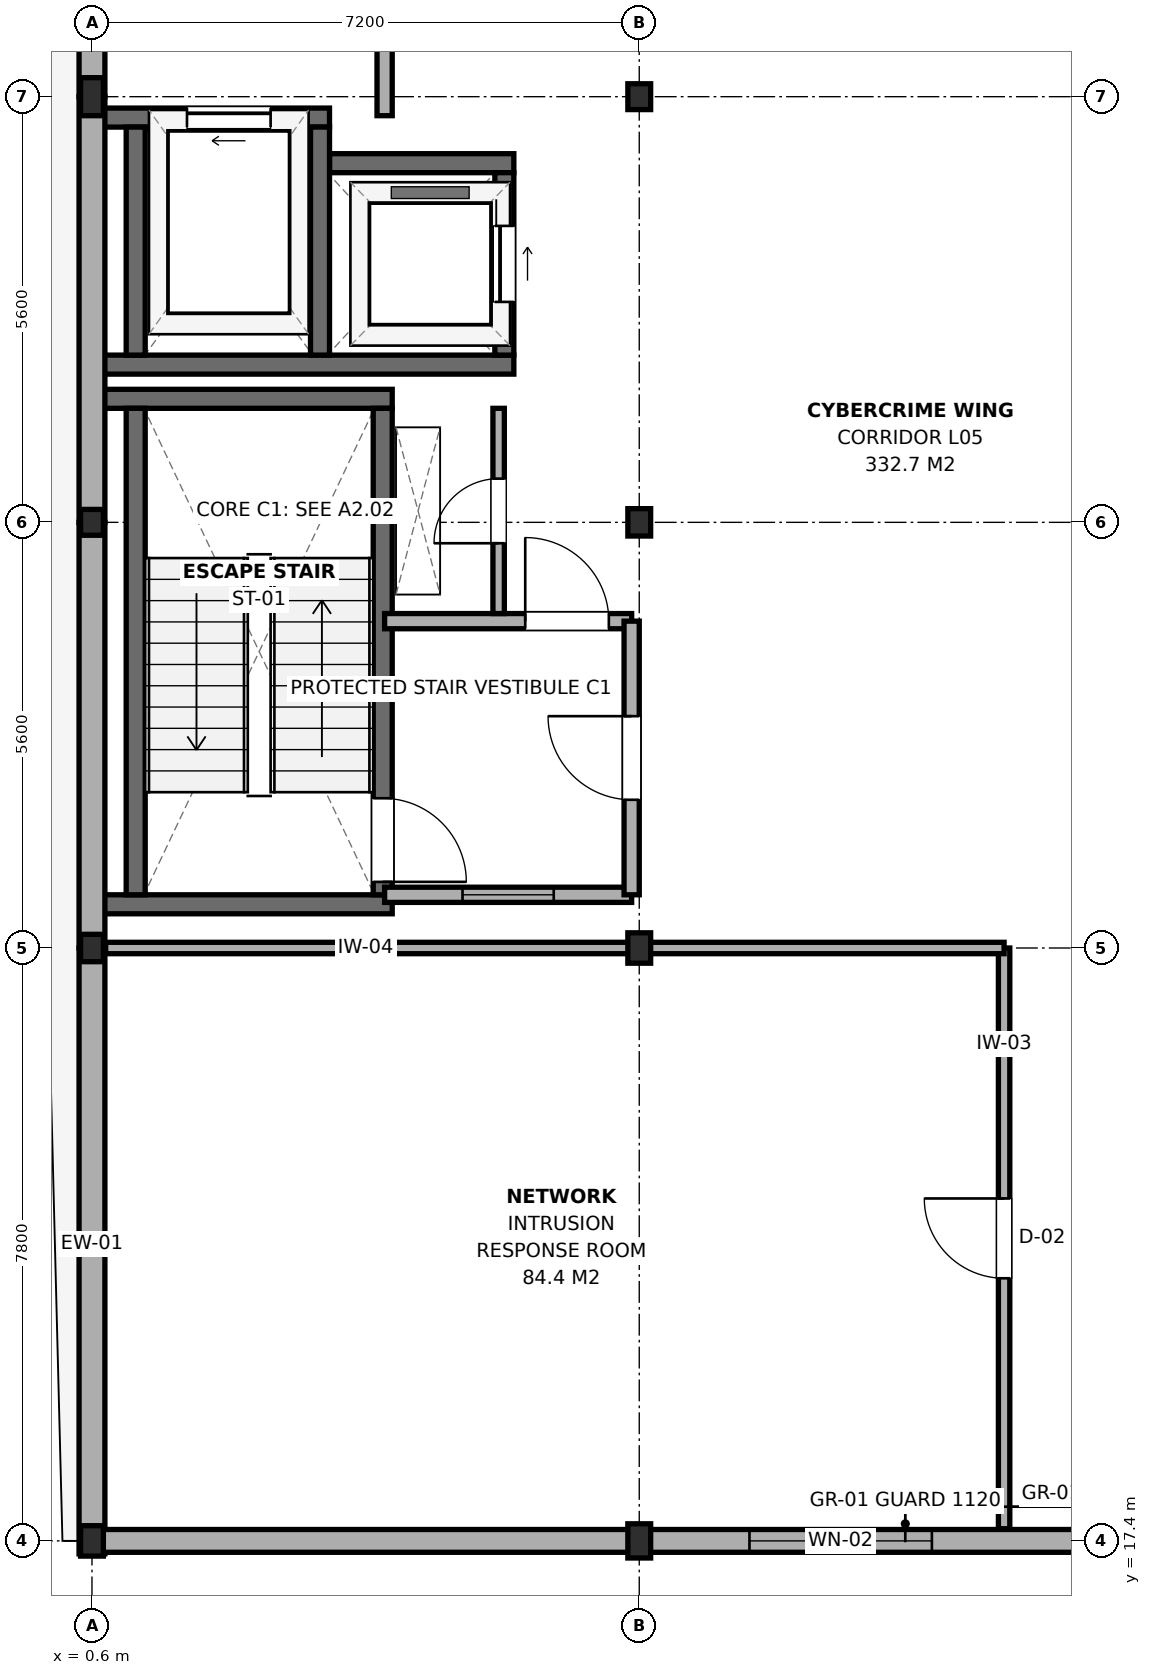
"""IFC4 building model, lengths in metres.
Left out: names, types, materials, properties, quantities, classifications, styles, units other than length and angle.
Written with IfcOpenShell. Run it as: python <this file> out.ifc"""

import sys

from ifc_helpers import new_model, si_unit, direction, frame, frame_2d, origin, origin_2d, place, context, subcontext, project, spatial, rectangle, i_section, extrude, element, fill, save


model = new_model("IFC4")
c1 = context("Model", 3, precision=1e-05, world=origin(), true_north=direction((0.0, 1.0)))
c2 = subcontext(c1, "Body", "Model", "MODEL_VIEW")
j1 = project(units=[si_unit("LENGTHUNIT", "METRE"), si_unit("PLANEANGLEUNIT", "RADIAN")], contexts=[c1])
p1 = place(None, origin())
s1 = spatial("IfcSite", under=j1, at=p1, CompositionType="ELEMENT")
p2 = place(p1, origin())
s2 = spatial("IfcBuilding", under=s1, at=p2, CompositionType="ELEMENT")
p3 = place(p2, frame((0.0, 0.0, 21.0)))
s3 = spatial("IfcBuildingStorey", under=s2, at=p3, CompositionType="ELEMENT", Elevation=21.0)
p4 = place(p3, frame((0.6, 17.4, 0.0), z_axis=(0.0, 0.0, 1.0), x_axis=(1.0, 0.0, 0.0)))
e1 = element("IfcColumn", 1, at=p4, inside=s3, PredefinedType="COLUMN", context=c2, shape_type="SweptSolid", body=[
    extrude(i_section(OverallWidth=0.3, OverallDepth=0.4, WebThickness=0.013, FlangeThickness=0.024, FilletRadius=0.027, at=origin_2d()), origin(), (0.0, 0.0, 1.0), 3.9),
])
p5 = place(p3, frame((0.6, 25.2, 0.0), z_axis=(0.0, 0.0, 1.0), x_axis=(1.0, 0.0, 0.0)))
e2 = element("IfcColumn", 2, at=p5, inside=s3, PredefinedType="COLUMN", context=c2, shape_type="SweptSolid", body=[
    extrude(i_section(OverallWidth=0.3, OverallDepth=0.36, WebThickness=0.012, FlangeThickness=0.022, FilletRadius=0.027, at=origin_2d()), origin(), (0.0, 0.0, 1.0), 3.9),
])
p6 = place(p3, frame((0.6, 30.8, 0.0), z_axis=(0.0, 0.0, 1.0), x_axis=(1.0, 0.0, 0.0)))
e3 = element("IfcColumn", 3, at=p6, inside=s3, PredefinedType="COLUMN", context=c2, shape_type="SweptSolid", body=[
    extrude(i_section(OverallWidth=0.3, OverallDepth=0.34, WebThickness=0.012, FlangeThickness=0.021, FilletRadius=0.027, at=origin_2d()), origin(), (0.0, 0.0, 1.0), 3.9),
])
p7 = place(p3, frame((0.6, 36.4, 0.0), z_axis=(0.0, 0.0, 1.0), x_axis=(1.0, 0.0, 0.0)))
e4 = element("IfcColumn", 4, at=p7, inside=s3, PredefinedType="COLUMN", context=c2, shape_type="SweptSolid", body=[
    extrude(i_section(OverallWidth=0.3, OverallDepth=0.5, WebThickness=0.014, FlangeThickness=0.028, FilletRadius=0.027, at=origin_2d()), origin(), (0.0, 0.0, 1.0), 3.9),
])
p8 = place(p3, frame((7.8, 17.4, 0.0), z_axis=(0.0, 0.0, 1.0), x_axis=(1.0, 0.0, 0.0)))
e5 = element("IfcColumn", 5, at=p8, inside=s3, PredefinedType="COLUMN", context=c2, shape_type="SweptSolid", body=[
    extrude(i_section(OverallWidth=0.3, OverallDepth=0.45, WebThickness=0.014, FlangeThickness=0.026, FilletRadius=0.027, at=origin_2d()), origin(), (0.0, 0.0, 1.0), 3.9),
])
p9 = place(p3, frame((7.8, 25.2, 0.0), z_axis=(0.0, 0.0, 1.0), x_axis=(1.0, 0.0, 0.0)))
e6 = element("IfcColumn", 6, at=p9, inside=s3, PredefinedType="COLUMN", context=c2, shape_type="SweptSolid", body=[
    extrude(i_section(OverallWidth=0.3, OverallDepth=0.4, WebThickness=0.013, FlangeThickness=0.024, FilletRadius=0.027, at=origin_2d()), origin(), (0.0, 0.0, 1.0), 3.9),
])
p10 = place(p3, frame((7.8, 30.8, 0.0), z_axis=(0.0, 0.0, 1.0), x_axis=(1.0, 0.0, 0.0)))
e7 = element("IfcColumn", 7, at=p10, inside=s3, PredefinedType="COLUMN", context=c2, shape_type="SweptSolid", body=[
    extrude(i_section(OverallWidth=0.3, OverallDepth=0.36, WebThickness=0.012, FlangeThickness=0.022, FilletRadius=0.027, at=origin_2d()), origin(), (0.0, 0.0, 1.0), 3.9),
])
p11 = place(p3, frame((7.8, 36.4, 0.0), z_axis=(0.0, 0.0, 1.0), x_axis=(1.0, 0.0, 0.0)))
e8 = element("IfcColumn", 8, at=p11, inside=s3, PredefinedType="COLUMN", context=c2, shape_type="SweptSolid", body=[
    extrude(i_section(OverallWidth=0.3, OverallDepth=0.34, WebThickness=0.012, FlangeThickness=0.021, FilletRadius=0.027, at=origin_2d()), origin(), (0.0, 0.0, 1.0), 3.9),
])
for number, where, z_axis, x_axis in (
    (9, (0.75, 25.775, 0.0), (0.0, 0.0, 1.0), (1.0, 0.0, 0.0)),
    (10, (0.75, 32.425, 0.0), (0.0, 0.0, 1.0), (1.0, 0.0, 0.0)),
):
    element("IfcWall", number, at=place(p3, frame(where, z_axis=z_axis, x_axis=x_axis)), inside=s3, PredefinedType="SHEAR", context=c2, shape_type="SweptSolid", body=[
        extrude(rectangle(XDim=3.8, YDim=0.25, at=frame_2d((1.9, 0.0))), origin(), (0.0, 0.0, 1.0), 3.7),
    ])
p12 = place(p3, frame((1.175, 25.9, 0.0), z_axis=(0.0, 0.0, 1.0), x_axis=(0.0, 1.0, 0.0)))
e11 = element("IfcWall", 11, at=p12, inside=s3, PredefinedType="SHEAR", context=c2, shape_type="SweptSolid", body=[
    extrude(rectangle(XDim=6.4, YDim=0.25, at=frame_2d((3.2, 0.0))), origin(), (0.0, 0.0, 1.0), 3.7),
])
p13 = place(p3, frame((4.425, 25.9, 0.0), z_axis=(0.0, 0.0, 1.0), x_axis=(0.0, 1.0, 0.0)))
e12 = element("IfcWall", 12, at=p13, inside=s3, PredefinedType="SHEAR", context=c2, shape_type="SweptSolid", body=[
    extrude(rectangle(XDim=6.4, YDim=0.25, at=frame_2d((3.2, 0.0))), origin(), (0.0, 0.0, 1.0), 3.7),
])
p14 = place(p13, frame((0.17, 0.0, 0.0)))
e13 = element("IfcOpeningElement", 13, at=p14, cuts=e12, PredefinedType="OPENING", context=c2, shape_type="SweptSolid", body=[
    extrude(rectangle(XDim=1.1, YDim=2.15, at=frame_2d((0.55, 1.075))), frame((0.0, 0.14, 0.0), z_axis=(0.0, -1.0, 0.0), x_axis=(1.0, 0.0, 0.0)), (0.0, 0.0, 1.0), 0.28),
])
p15 = place(p3, frame((0.75, 32.875, 0.0), z_axis=(0.0, 0.0, 1.0), x_axis=(1.0, 0.0, 0.0)))
e14 = element("IfcWall", 14, at=p15, inside=s3, PredefinedType="SHEAR", context=c2, shape_type="SweptSolid", body=[
    extrude(rectangle(XDim=5.4, YDim=0.25, at=frame_2d((2.7, 0.0))), origin(), (0.0, 0.0, 1.0), 3.7),
])
p16 = place(p3, frame((0.75, 36.125, 0.0), z_axis=(0.0, 0.0, 1.0), x_axis=(1.0, 0.0, 0.0)))
e15 = element("IfcWall", 15, at=p16, inside=s3, PredefinedType="SHEAR", context=c2, shape_type="SweptSolid", body=[
    extrude(rectangle(XDim=2.975, YDim=0.25, at=frame_2d((1.488, 0.0))), origin(), (0.0, 0.0, 1.0), 3.7),
])
p17 = place(p16, frame((1.1, 0.0, 0.0)))
e16 = element("IfcOpeningElement", 16, at=p17, cuts=e15, PredefinedType="OPENING", context=c2, shape_type="SweptSolid", body=[
    extrude(rectangle(XDim=1.1, YDim=2.15, at=frame_2d((0.55, 1.075))), frame((0.0, 0.14, 0.0), z_axis=(0.0, -1.0, 0.0), x_axis=(1.0, 0.0, 0.0)), (0.0, 0.0, 1.0), 0.28),
])
p18 = place(p3, frame((3.725, 35.525, 0.0), z_axis=(0.0, 0.0, 1.0), x_axis=(1.0, 0.0, 0.0)))
e17 = element("IfcWall", 17, at=p18, inside=s3, PredefinedType="SHEAR", context=c2, shape_type="SweptSolid", body=[
    extrude(rectangle(XDim=2.425, YDim=0.25, at=frame_2d((1.212, 0.0))), origin(), (0.0, 0.0, 1.0), 3.7),
])
for number, where, z_axis, x_axis in (
    (18, (1.175, 33.0, 0.0), (0.0, 0.0, 1.0), (0.0, 1.0, 0.0)),
    (19, (3.6, 33.0, 0.0), (0.0, 0.0, 1.0), (0.0, 1.0, 0.0)),
):
    element("IfcWall", number, at=place(p3, frame(where, z_axis=z_axis, x_axis=x_axis)), inside=s3, PredefinedType="SHEAR", context=c2, shape_type="SweptSolid", body=[
        extrude(rectangle(XDim=3.0, YDim=0.25, at=frame_2d((1.5, 0.0))), origin(), (0.0, 0.0, 1.0), 3.7),
    ])
p19 = place(p3, frame((6.025, 33.0, 0.0), z_axis=(0.0, 0.0, 1.0), x_axis=(0.0, 1.0, 0.0)))
e20 = element("IfcWall", 20, at=p19, inside=s3, PredefinedType="SHEAR", context=c2, shape_type="SweptSolid", body=[
    extrude(rectangle(XDim=2.4, YDim=0.25, at=frame_2d((1.2, 0.0))), origin(), (0.0, 0.0, 1.0), 3.7),
])
p20 = place(p19, frame((0.7, 0.0, 0.0)))
e21 = element("IfcOpeningElement", 21, at=p20, cuts=e20, PredefinedType="OPENING", context=c2, shape_type="SweptSolid", body=[
    extrude(rectangle(XDim=1.0, YDim=2.15, at=frame_2d((0.5, 1.075))), frame((0.0, 0.14, 0.0), z_axis=(0.0, -1.0, 0.0), x_axis=(1.0, 0.0, 0.0)), (0.0, 0.0, 1.0), 0.28),
])
p21 = place(p3, frame((0.6, 17.23, 0.0), z_axis=(0.0, 0.0, 1.0), x_axis=(0.0, 1.0, 0.0)))
e22 = element("IfcWall", 22, at=p21, inside=s3, PredefinedType="SOLIDWALL", context=c2, shape_type="SweptSolid", body=[
    extrude(rectangle(XDim=7.97, YDim=0.34, at=frame_2d((3.985, 0.0))), origin(), (0.0, 0.0, 1.0), 3.245),
])
p22 = place(p3, frame((0.6, 25.2, 0.0), z_axis=(0.0, 0.0, 1.0), x_axis=(0.0, 1.0, 0.0)))
e23 = element("IfcWall", 23, at=p22, inside=s3, PredefinedType="SOLIDWALL", context=c2, shape_type="SweptSolid", body=[
    extrude(rectangle(XDim=5.6, YDim=0.34, at=frame_2d((2.8, 0.0))), origin(), (0.0, 0.0, 1.0), 3.245),
])
p23 = place(p3, frame((0.6, 30.8, 0.0), z_axis=(0.0, 0.0, 1.0), x_axis=(0.0, 1.0, 0.0)))
e24 = element("IfcWall", 24, at=p23, inside=s3, PredefinedType="SOLIDWALL", context=c2, shape_type="SweptSolid", body=[
    extrude(rectangle(XDim=5.6, YDim=0.34, at=frame_2d((2.8, 0.0))), origin(), (0.0, 0.0, 1.0), 3.095),
])
p24 = place(p3, frame((0.6, 36.4, 0.0), z_axis=(0.0, 0.0, 1.0), x_axis=(0.0, 1.0, 0.0)))
e25 = element("IfcWall", 25, at=p24, inside=s3, PredefinedType="SOLIDWALL", context=c2, shape_type="SweptSolid", body=[
    extrude(rectangle(XDim=5.6, YDim=0.34, at=frame_2d((2.8, 0.0))), origin(), (0.0, 0.0, 1.0), 3.095),
])
p25 = place(p24, frame((0.85, 0.0, 0.9)))
e26 = element("IfcOpeningElement", 26, at=p25, cuts=e25, PredefinedType="OPENING", context=c2, shape_type="SweptSolid", body=[
    extrude(rectangle(XDim=2.0, YDim=1.8, at=frame_2d((1.0, 0.9))), frame((0.0, 0.185, 0.0), z_axis=(0.0, -1.0, 0.0), x_axis=(1.0, 0.0, 0.0)), (0.0, 0.0, 1.0), 0.37),
])
p26 = place(p3, frame((0.45, 17.4, 0.0), z_axis=(0.0, 0.0, 1.0), x_axis=(1.0, 0.0, 0.0)))
e27 = element("IfcWall", 27, at=p26, inside=s3, PredefinedType="SOLIDWALL", context=c2, shape_type="SweptSolid", body=[
    extrude(rectangle(XDim=7.35, YDim=0.3, at=frame_2d((3.675, 0.0))), origin(), (0.0, 0.0, 1.0), 3.245),
])
p27 = place(p3, frame((7.8, 17.4, 0.0), z_axis=(0.0, 0.0, 1.0), x_axis=(1.0, 0.0, 0.0)))
e28 = element("IfcWall", 28, at=p27, inside=s3, PredefinedType="SOLIDWALL", context=c2, shape_type="SweptSolid", body=[
    extrude(rectangle(XDim=7.2, YDim=0.3, at=frame_2d((3.6, 0.0))), origin(), (0.0, 0.0, 1.0), 3.245),
])
p28 = place(p27, frame((1.45, 0.0, 0.9)))
e29 = element("IfcOpeningElement", 29, at=p28, cuts=e28, PredefinedType="OPENING", context=c2, shape_type="SweptSolid", body=[
    extrude(rectangle(XDim=2.4, YDim=2.1, at=frame_2d((1.2, 1.05))), frame((0.0, 0.165, 0.0), z_axis=(0.0, -1.0, 0.0), x_axis=(1.0, 0.0, 0.0)), (0.0, 0.0, 1.0), 0.33),
])
p29 = place(p3, frame((4.45, 36.15, 0.0), z_axis=(0.0, 0.0, 1.0), x_axis=(0.0, 1.0, 0.0)))
e30 = element("IfcWall", 30, at=p29, inside=s3, PredefinedType="PARTITIONING", context=c2, shape_type="SweptSolid", body=[
    extrude(rectangle(XDim=3.4, YDim=0.2, at=frame_2d((1.7, 0.0))), origin(), (0.0, 0.0, 1.0), 3.365),
])
p30 = place(p29, frame((1.15, 0.0, 0.0)))
e31 = element("IfcOpeningElement", 31, at=p30, cuts=e30, PredefinedType="OPENING", context=c2, shape_type="SweptSolid", body=[
    extrude(rectangle(XDim=1.1, YDim=2.15, at=frame_2d((0.55, 1.075))), frame((0.0, 0.115, 0.0), z_axis=(0.0, -1.0, 0.0), x_axis=(1.0, 0.0, 0.0)), (0.0, 0.0, 1.0), 0.23),
])
p31 = place(p3, frame((4.45, 25.9, 0.0), z_axis=(0.0, 0.0, 1.0), x_axis=(1.0, 0.0, 0.0)))
e32 = element("IfcWall", 32, at=p31, inside=s3, PredefinedType="PARTITIONING", context=c2, shape_type="SweptSolid", body=[
    extrude(rectangle(XDim=3.25, YDim=0.2, at=frame_2d((1.625, 0.0))), origin(), (0.0, 0.0, 1.0), 3.195),
])
p32 = place(p31, frame((1.025, 0.0, 0.95)))
e33 = element("IfcOpeningElement", 33, at=p32, cuts=e32, PredefinedType="OPENING", context=c2, shape_type="SweptSolid", body=[
    extrude(rectangle(XDim=1.2, YDim=1.5, at=frame_2d((0.6, 0.75))), frame((0.0, 0.115, 0.0), z_axis=(0.0, -1.0, 0.0), x_axis=(1.0, 0.0, 0.0)), (0.0, 0.0, 1.0), 0.23),
])
p33 = place(p3, frame((4.45, 29.5, 0.0), z_axis=(0.0, 0.0, 1.0), x_axis=(1.0, 0.0, 0.0)))
e34 = element("IfcWall", 34, at=p33, inside=s3, PredefinedType="PARTITIONING", context=c2, shape_type="SweptSolid", body=[
    extrude(rectangle(XDim=3.25, YDim=0.2, at=frame_2d((1.625, 0.0))), origin(), (0.0, 0.0, 1.0), 3.195),
])
p34 = place(p33, frame((1.85, 0.0, 0.0)))
e35 = element("IfcOpeningElement", 35, at=p34, cuts=e34, PredefinedType="OPENING", context=c2, shape_type="SweptSolid", body=[
    extrude(rectangle(XDim=1.1, YDim=2.15, at=frame_2d((0.55, 1.075))), frame((0.0, 0.115, 0.0), z_axis=(0.0, -1.0, 0.0), x_axis=(1.0, 0.0, 0.0)), (0.0, 0.0, 1.0), 0.23),
])
p35 = place(p3, frame((7.7, 25.9, 0.0), z_axis=(0.0, 0.0, 1.0), x_axis=(0.0, 1.0, 0.0)))
e36 = element("IfcWall", 36, at=p35, inside=s3, PredefinedType="PARTITIONING", context=c2, shape_type="SweptSolid", body=[
    extrude(rectangle(XDim=3.6, YDim=0.2, at=frame_2d((1.8, 0.0))), origin(), (0.0, 0.0, 1.0), 3.195),
])
p36 = place(p35, frame((1.25, 0.0, 0.0)))
e37 = element("IfcOpeningElement", 37, at=p36, cuts=e36, PredefinedType="OPENING", context=c2, shape_type="SweptSolid", body=[
    extrude(rectangle(XDim=1.1, YDim=2.15, at=frame_2d((0.55, 1.075))), frame((0.0, 0.115, 0.0), z_axis=(0.0, -1.0, 0.0), x_axis=(1.0, 0.0, 0.0)), (0.0, 0.0, 1.0), 0.23),
])
p37 = place(p3, frame((5.95, 29.6, 0.0), z_axis=(0.0, 0.0, 1.0), x_axis=(0.0, 1.0, 0.0)))
e38 = element("IfcWall", 38, at=p37, inside=s3, PredefinedType="PARTITIONING", context=c2, shape_type="SweptSolid", body=[
    extrude(rectangle(XDim=2.7, YDim=0.15, at=frame_2d((1.35, 0.0))), origin(), (0.0, 0.0, 1.0), 3.695),
])
p38 = place(p37, frame((0.925, 0.0, 0.0)))
e39 = element("IfcOpeningElement", 39, at=p38, cuts=e38, PredefinedType="OPENING", context=c2, shape_type="SweptSolid", body=[
    extrude(rectangle(XDim=0.85, YDim=2.1, at=frame_2d((0.425, 1.05))), frame((0.0, 0.09, 0.0), z_axis=(0.0, -1.0, 0.0), x_axis=(1.0, 0.0, 0.0)), (0.0, 0.0, 1.0), 0.18),
])
p39 = place(p3, frame((12.6, 17.56, 0.0), z_axis=(0.0, 0.0, 1.0), x_axis=(0.0, 1.0, 0.0)))
e40 = element("IfcWall", 40, at=p39, inside=s3, PredefinedType="PARTITIONING", context=c2, shape_type="SweptSolid", body=[
    extrude(rectangle(XDim=7.64, YDim=0.15, at=frame_2d((3.82, 0.0))), origin(), (0.0, 0.0, 1.0), 3.145),
])
p40 = place(p39, frame((3.295, 0.0, 0.0)))
e41 = element("IfcOpeningElement", 41, at=p40, cuts=e40, PredefinedType="OPENING", context=c2, shape_type="SweptSolid", body=[
    extrude(rectangle(XDim=1.05, YDim=2.15, at=frame_2d((0.525, 1.075))), frame((0.0, 0.09, 0.0), z_axis=(0.0, -1.0, 0.0), x_axis=(1.0, 0.0, 0.0)), (0.0, 0.0, 1.0), 0.18),
])
p41 = place(p3, frame((0.78, 25.2, 0.0), z_axis=(0.0, 0.0, 1.0), x_axis=(1.0, 0.0, 0.0)))
e42 = element("IfcWall", 42, at=p41, inside=s3, PredefinedType="PARTITIONING", context=c2, shape_type="SweptSolid", body=[
    extrude(rectangle(XDim=11.82, YDim=0.15, at=frame_2d((5.91, 0.0))), origin(), (0.0, 0.0, 1.0), 3.095),
])
p42 = place(p28, origin())
e43 = element("IfcWindow", 43, at=p42, inside=s3, PartitioningType="SINGLE_PANEL", PredefinedType="WINDOW", context=c2, shape_type="SweptSolid", body=[
    extrude(rectangle(XDim=2.4, YDim=2.1, at=frame_2d((1.2, 1.05))), frame((0.0, 0.03, 0.0), z_axis=(0.0, -1.0, 0.0), x_axis=(1.0, 0.0, 0.0)), (0.0, 0.0, 1.0), 0.06),
])
fill(e29, e43)
p43 = place(p14, frame((1.1, 0.0, 0.0), z_axis=(0.0, 0.0, 1.0), x_axis=(-1.0, 0.0, 0.0)))
e44 = element("IfcDoor", 44, at=p43, inside=s3, OperationType="SINGLE_SWING_RIGHT", PredefinedType="DOOR", context=c2, shape_type="SweptSolid", body=[
    extrude(rectangle(XDim=1.1, YDim=2.15, at=frame_2d((0.55, 1.075))), frame((0.0, 0.025, 0.0), z_axis=(0.0, -1.0, 0.0), x_axis=(1.0, 0.0, 0.0)), (0.0, 0.0, 1.0), 0.05),
])
fill(e13, e44)
p44 = place(p17, origin())
e45 = element("IfcDoor", 45, at=p44, inside=s3, OperationType="SLIDING_TO_LEFT", PredefinedType="DOOR", context=c2, shape_type="SweptSolid", body=[
    extrude(rectangle(XDim=1.1, YDim=2.15, at=frame_2d((0.55, 1.075))), frame((0.0, 0.025, 0.0), z_axis=(0.0, -1.0, 0.0), x_axis=(1.0, 0.0, 0.0)), (0.0, 0.0, 1.0), 0.05),
])
fill(e16, e45)
p45 = place(p20, frame((1.0, 0.0, 0.0), z_axis=(0.0, 0.0, 1.0), x_axis=(-1.0, 0.0, 0.0)))
e46 = element("IfcDoor", 46, at=p45, inside=s3, OperationType="SLIDING_TO_RIGHT", PredefinedType="DOOR", context=c2, shape_type="SweptSolid", body=[
    extrude(rectangle(XDim=1.0, YDim=2.15, at=frame_2d((0.5, 1.075))), frame((0.0, 0.025, 0.0), z_axis=(0.0, -1.0, 0.0), x_axis=(1.0, 0.0, 0.0)), (0.0, 0.0, 1.0), 0.05),
])
fill(e21, e46)
p46 = place(p32, origin())
e47 = element("IfcWindow", 47, at=p46, inside=s3, PartitioningType="SINGLE_PANEL", PredefinedType="WINDOW", context=c2, shape_type="SweptSolid", body=[
    extrude(rectangle(XDim=1.2, YDim=1.5, at=frame_2d((0.6, 0.75))), frame((0.0, 0.03, 0.0), z_axis=(0.0, -1.0, 0.0), x_axis=(1.0, 0.0, 0.0)), (0.0, 0.0, 1.0), 0.06),
])
fill(e33, e47)
p47 = place(p34, origin())
e48 = element("IfcDoor", 48, at=p47, inside=s3, OperationType="SINGLE_SWING_LEFT", PredefinedType="DOOR", context=c2, shape_type="SweptSolid", body=[
    extrude(rectangle(XDim=1.1, YDim=2.15, at=frame_2d((0.55, 1.075))), frame((0.0, 0.025, 0.0), z_axis=(0.0, -1.0, 0.0), x_axis=(1.0, 0.0, 0.0)), (0.0, 0.0, 1.0), 0.05),
])
fill(e35, e48)
p48 = place(p36, origin())
e49 = element("IfcDoor", 49, at=p48, inside=s3, OperationType="SINGLE_SWING_RIGHT", PredefinedType="DOOR", context=c2, shape_type="SweptSolid", body=[
    extrude(rectangle(XDim=1.1, YDim=2.15, at=frame_2d((0.55, 1.075))), frame((0.0, 0.025, 0.0), z_axis=(0.0, -1.0, 0.0), x_axis=(1.0, 0.0, 0.0)), (0.0, 0.0, 1.0), 0.05),
])
fill(e37, e49)
p49 = place(p38, origin())
e50 = element("IfcDoor", 50, at=p49, inside=s3, OperationType="SINGLE_SWING_LEFT", PredefinedType="DOOR", context=c2, shape_type="SweptSolid", body=[
    extrude(rectangle(XDim=0.85, YDim=2.1, at=frame_2d((0.425, 1.05))), frame((0.0, 0.025, 0.0), z_axis=(0.0, -1.0, 0.0), x_axis=(1.0, 0.0, 0.0)), (0.0, 0.0, 1.0), 0.05),
])
fill(e39, e50)
p50 = place(p40, origin())
e51 = element("IfcDoor", 51, at=p50, inside=s3, OperationType="SINGLE_SWING_RIGHT", PredefinedType="DOOR", context=c2, shape_type="SweptSolid", body=[
    extrude(rectangle(XDim=1.05, YDim=2.15, at=frame_2d((0.525, 1.075))), frame((0.0, 0.025, 0.0), z_axis=(0.0, -1.0, 0.0), x_axis=(1.0, 0.0, 0.0)), (0.0, 0.0, 1.0), 0.05),
])
fill(e41, e51)
save(model, sys.argv[1])
